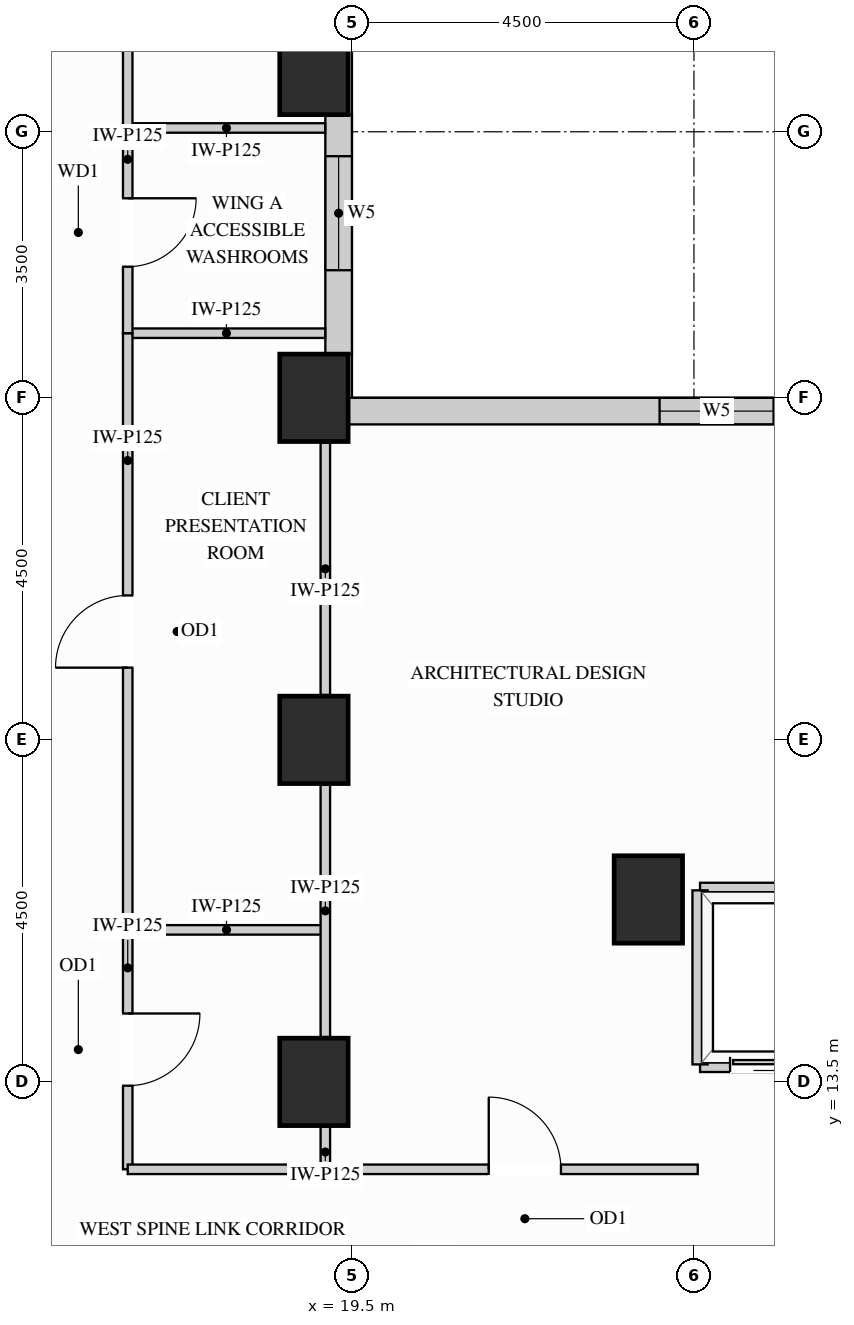
"""IFC4 building model, lengths in metres.
Left out: names, types, materials, properties, quantities, classifications, styles, units other than length and angle.
Written with IfcOpenShell. Run it as: python <this file> out.ifc"""

import sys

from ifc_helpers import new_model, si_unit, direction, frame, frame_2d, origin, origin_2d, place, context, subcontext, project, spatial, rectangle, extrude, source, transform, mapped, element, fill, save


model = new_model("IFC4")
c1 = context("Model", 3, precision=1e-05, world=origin(), true_north=direction((0.0, 1.0)))
c2 = subcontext(c1, "Body", "Model", "MODEL_VIEW")
j1 = project(units=[si_unit("LENGTHUNIT", "METRE"), si_unit("PLANEANGLEUNIT", "RADIAN")], contexts=[c1])
p1 = place(None, origin())
s1 = spatial("IfcSite", under=j1, at=p1, CompositionType="ELEMENT")
p2 = place(p1, origin())
s2 = spatial("IfcBuilding", under=s1, at=p2, CompositionType="ELEMENT")
p3 = place(p2, frame((0.0, 0.0, 84.6)))
s3 = spatial("IfcBuildingStorey", under=s2, at=p3, CompositionType="ELEMENT", Elevation=84.6)
m1 = source(origin(), c2, "Body", "SweptSolid", [
    extrude(rectangle(XDim=0.9, YDim=1.15, at=origin_2d()), origin(), (0.0, 0.0, 1.0), 3.38),
])
for number, where, z_axis, x_axis in (
    (1, (19.0, 13.5, 0.0), (0.0, 0.0, 1.0), (1.0, 0.0, 0.0)),
    (2, (19.0, 18.0, 0.0), (0.0, 0.0, 1.0), (1.0, 0.0, 0.0)),
    (3, (19.0, 22.5, 0.0), (0.0, 0.0, 1.0), (1.0, 0.0, 0.0)),
    (4, (19.0, 26.8, 0.0), (0.0, 0.0, 1.0), (1.0, 0.0, 0.0)),
    (5, (23.4, 15.9, 0.0), (0.0, 0.0, 1.0), (1.0, 0.0, 0.0)),
):
    element("IfcColumn", number, at=place(p3, frame(where, z_axis=z_axis, x_axis=x_axis)), inside=s3, PredefinedType="COLUMN", context=c2, shape_type="MappedRepresentation", body=[
        mapped(m1, transform((0.0, 0.0, 0.0), x_axis=(1.0, 0.0, 0.0), y_axis=(0.0, 1.0, 0.0), z_axis=(0.0, 0.0, 1.0))),
    ])
p4 = place(p3, frame((34.427, 22.325, 0.0), z_axis=(0.0, 0.0, 1.0), x_axis=(-1.0, 0.0, 0.0)))
e6 = element("IfcWall", 6, at=p4, inside=s3, PredefinedType="SOLIDWALL", context=c2, shape_type="SweptSolid", body=[
    extrude(rectangle(XDim=14.979, YDim=0.35, at=frame_2d((7.49, 0.0))), origin(), (0.0, 0.0, 1.0), 3.365),
])
p5 = place(p4, frame((4.1, 0.0, 0.78)))
e7 = element("IfcOpeningElement", 7, at=p5, cuts=e6, PredefinedType="OPENING", context=c2, shape_type="SweptSolid", body=[
    extrude(rectangle(XDim=1.5, YDim=2.0, at=frame_2d((0.75, 1.0))), frame((0.0, 0.185, 0.0), z_axis=(0.0, -1.0, 0.0), x_axis=(1.0, 0.0, 0.0)), (0.0, 0.0, 1.0), 0.37),
])
p6 = place(p4, frame((9.379, 0.0, 0.78)))
e8 = element("IfcOpeningElement", 8, at=p6, cuts=e6, PredefinedType="OPENING", context=c2, shape_type="SweptSolid", body=[
    extrude(rectangle(XDim=1.5, YDim=2.0, at=frame_2d((0.75, 1.0))), frame((0.0, 0.185, 0.0), z_axis=(0.0, -1.0, 0.0), x_axis=(1.0, 0.0, 0.0)), (0.0, 0.0, 1.0), 0.37),
])
p7 = place(p3, frame((19.325, 23.073, 0.0), z_axis=(0.0, 0.0, 1.0), x_axis=(0.0, 1.0, 0.0)))
e9 = element("IfcWall", 9, at=p7, inside=s3, PredefinedType="SOLIDWALL", context=c2, shape_type="SweptSolid", body=[
    extrude(rectangle(XDim=3.154, YDim=0.35, at=frame_2d((1.577, 0.0))), origin(), (0.0, 0.0, 1.0), 2.519),
])
p8 = place(p7, frame((1.105, 0.0, 0.78)))
e10 = element("IfcOpeningElement", 10, at=p8, cuts=e9, PredefinedType="OPENING", context=c2, shape_type="SweptSolid", body=[
    extrude(rectangle(XDim=1.5, YDim=1.559, at=frame_2d((0.75, 0.78))), frame((0.0, 0.185, 0.0), z_axis=(0.0, -1.0, 0.0), x_axis=(1.0, 0.0, 0.0)), (0.0, 0.0, 1.0), 0.37),
])
m2 = source(origin(), c2, "Body", "SweptSolid", [
    extrude(rectangle(XDim=2.6, YDim=0.125, at=frame_2d((1.3, 0.0))), origin(), (0.0, 0.0, 1.0), 3.365),
])
p9 = place(p3, frame((16.55, 15.5, 0.0), z_axis=(0.0, 0.0, 1.0), x_axis=(1.0, 0.0, 0.0)))
e11 = element("IfcWall", 11, at=p9, inside=s3, PredefinedType="PARTITIONING", context=c2, shape_type="MappedRepresentation", body=[
    mapped(m2, transform((0.0, 0.0, 0.0), x_axis=(1.0, 0.0, 0.0), y_axis=(0.0, 1.0, 0.0), z_axis=(0.0, 0.0, 1.0))),
])
m3 = source(origin(), c2, "Body", "SweptSolid", [
    extrude(rectangle(XDim=2.598, YDim=0.125, at=frame_2d((1.299, 0.0))), origin(), (0.0, 0.0, 1.0), 3.365),
])
for number, where, z_axis, x_axis in (
    (12, (16.55, 23.35, 0.0), (0.0, 0.0, 1.0), (1.0, 0.0, 0.0)),
    (13, (16.55, 26.05, 0.0), (0.0, 0.0, 1.0), (1.0, 0.0, 0.0)),
):
    element("IfcWall", number, at=place(p3, frame(where, z_axis=z_axis, x_axis=x_axis)), inside=s3, PredefinedType="PARTITIONING", context=c2, shape_type="MappedRepresentation", body=[
        mapped(m3, transform((0.0, 0.0, 0.0), x_axis=(1.0, 0.0, 0.0), y_axis=(0.0, 1.0, 0.0), z_axis=(0.0, 0.0, 1.0))),
    ])
m4 = source(origin(), c2, "Body", "SweptSolid", [
    extrude(rectangle(XDim=0.56, YDim=0.125, at=frame_2d((0.28, 0.0))), origin(), (0.0, 0.0, 1.0), 2.677),
])
p10 = place(p3, frame((19.15, 12.35, 0.0), z_axis=(0.0, 0.0, 1.0), x_axis=(0.0, 1.0, 0.0)))
e14 = element("IfcWall", 14, at=p10, inside=s3, PredefinedType="PARTITIONING", context=c2, shape_type="MappedRepresentation", body=[
    mapped(m4, transform((0.0, 0.0, 0.0), x_axis=(1.0, 0.0, 0.0), y_axis=(0.0, 1.0, 0.0), z_axis=(0.0, 0.0, 1.0))),
])
m5 = source(origin(), c2, "Body", "SweptSolid", [
    extrude(rectangle(XDim=3.32, YDim=0.125, at=frame_2d((1.66, 0.0))), origin(), (0.0, 0.0, 1.0), 2.677),
])
for number, where, z_axis, x_axis in (
    (15, (19.15, 14.09, 0.0), (0.0, 0.0, 1.0), (0.0, 1.0, 0.0)),
    (16, (19.15, 18.59, 0.0), (0.0, 0.0, 1.0), (0.0, 1.0, 0.0)),
):
    element("IfcWall", number, at=place(p3, frame(where, z_axis=z_axis, x_axis=x_axis)), inside=s3, PredefinedType="PARTITIONING", context=c2, shape_type="MappedRepresentation", body=[
        mapped(m5, transform((0.0, 0.0, 0.0), x_axis=(1.0, 0.0, 0.0), y_axis=(0.0, 1.0, 0.0), z_axis=(0.0, 0.0, 1.0))),
    ])
p11 = place(p3, frame((16.55, 12.35, 0.0), z_axis=(0.0, 0.0, 1.0), x_axis=(0.0, 1.0, 0.0)))
e17 = element("IfcWall", 17, at=p11, inside=s3, PredefinedType="PARTITIONING", context=c2, shape_type="SweptSolid", body=[
    extrude(rectangle(XDim=3.15, YDim=0.125, at=frame_2d((1.575, 0.0))), origin(), (0.0, 0.0, 1.0), 3.365),
])
p12 = place(p11, frame((1.1, 0.0, 0.0)))
e18 = element("IfcOpeningElement", 18, at=p12, cuts=e17, PredefinedType="OPENING", context=c2, shape_type="SweptSolid", body=[
    extrude(rectangle(XDim=0.95, YDim=2.15, at=frame_2d((0.475, 1.075))), frame((0.0, 0.073, 0.0), z_axis=(0.0, -1.0, 0.0), x_axis=(1.0, 0.0, 0.0)), (0.0, 0.0, 1.0), 0.145),
])
p13 = place(p3, frame((16.55, 15.5, 0.0), z_axis=(0.0, 0.0, 1.0), x_axis=(0.0, 1.0, 0.0)))
e19 = element("IfcWall", 19, at=p13, inside=s3, PredefinedType="PARTITIONING", context=c2, shape_type="SweptSolid", body=[
    extrude(rectangle(XDim=7.85, YDim=0.125, at=frame_2d((3.925, 0.0))), origin(), (0.0, 0.0, 1.0), 3.365),
])
p14 = place(p13, frame((3.45, 0.0, 0.0)))
e20 = element("IfcOpeningElement", 20, at=p14, cuts=e19, PredefinedType="OPENING", context=c2, shape_type="SweptSolid", body=[
    extrude(rectangle(XDim=0.95, YDim=2.15, at=frame_2d((0.475, 1.075))), frame((0.0, 0.073, 0.0), z_axis=(0.0, -1.0, 0.0), x_axis=(1.0, 0.0, 0.0)), (0.0, 0.0, 1.0), 0.145),
])
p15 = place(p3, frame((16.55, 26.05, 0.0), z_axis=(0.0, 0.0, 1.0), x_axis=(0.0, 1.0, 0.0)))
e21 = element("IfcWall", 21, at=p15, inside=s3, PredefinedType="PARTITIONING", context=c2, shape_type="SweptSolid", body=[
    extrude(rectangle(XDim=7.1, YDim=0.125, at=frame_2d((3.55, 0.0))), origin(), (0.0, 0.0, 1.0), 3.365),
])
p16 = place(p15, frame((3.075, 0.0, 0.0)))
e22 = element("IfcOpeningElement", 22, at=p16, cuts=e21, PredefinedType="OPENING", context=c2, shape_type="SweptSolid", body=[
    extrude(rectangle(XDim=0.95, YDim=2.15, at=frame_2d((0.475, 1.075))), frame((0.0, 0.073, 0.0), z_axis=(0.0, -1.0, 0.0), x_axis=(1.0, 0.0, 0.0)), (0.0, 0.0, 1.0), 0.145),
])
p17 = place(p3, frame((16.55, 23.35, 0.0), z_axis=(0.0, 0.0, 1.0), x_axis=(0.0, 1.0, 0.0)))
e23 = element("IfcWall", 23, at=p17, inside=s3, PredefinedType="PARTITIONING", context=c2, shape_type="SweptSolid", body=[
    extrude(rectangle(XDim=2.7, YDim=0.125, at=frame_2d((1.35, 0.0))), origin(), (0.0, 0.0, 1.0), 3.365),
])
p18 = place(p17, frame((0.875, 0.0, 0.0)))
e24 = element("IfcOpeningElement", 24, at=p18, cuts=e23, PredefinedType="OPENING", context=c2, shape_type="SweptSolid", body=[
    extrude(rectangle(XDim=0.9, YDim=2.15, at=frame_2d((0.45, 1.075))), frame((0.0, 0.073, 0.0), z_axis=(0.0, -1.0, 0.0), x_axis=(1.0, 0.0, 0.0)), (0.0, 0.0, 1.0), 0.145),
])
m6 = source(origin(), c2, "Body", "SweptSolid", [
    extrude(rectangle(XDim=2.95, YDim=0.125, at=frame_2d((1.475, 0.0))), origin(), (0.0, 0.0, 1.0), 3.365),
])
p19 = place(p3, frame((16.55, 12.35, 0.0), z_axis=(0.0, 0.0, 1.0), x_axis=(1.0, 0.0, 0.0)))
e25 = element("IfcWall", 25, at=p19, inside=s3, PredefinedType="PARTITIONING", context=c2, shape_type="MappedRepresentation", body=[
    mapped(m6, transform((0.0, 0.0, 0.0), x_axis=(1.0, 0.0, 0.0), y_axis=(0.0, 1.0, 0.0), z_axis=(0.0, 0.0, 1.0))),
])
p20 = place(p3, frame((19.5, 12.35, 0.0), z_axis=(0.0, 0.0, 1.0), x_axis=(1.0, 0.0, 0.0)))
e26 = element("IfcWall", 26, at=p20, inside=s3, PredefinedType="PARTITIONING", context=c2, shape_type="SweptSolid", body=[
    extrude(rectangle(XDim=4.55, YDim=0.125, at=frame_2d((2.275, 0.0))), origin(), (0.0, 0.0, 1.0), 3.365),
])
p21 = place(p20, frame((1.8, 0.0, 0.0)))
e27 = element("IfcOpeningElement", 27, at=p21, cuts=e26, PredefinedType="OPENING", context=c2, shape_type="SweptSolid", body=[
    extrude(rectangle(XDim=0.95, YDim=2.15, at=frame_2d((0.475, 1.075))), frame((0.0, 0.073, 0.0), z_axis=(0.0, -1.0, 0.0), x_axis=(1.0, 0.0, 0.0)), (0.0, 0.0, 1.0), 0.145),
])
m7 = source(origin(), c2, "Body", "SweptSolid", [
    extrude(rectangle(XDim=1.89, YDim=0.2, at=frame_2d((0.945, 0.0))), origin(), (0.0, 0.0, 1.0), 2.677),
])
p22 = place(p3, frame((24.08, 16.02, 0.0), z_axis=(0.0, 0.0, 1.0), x_axis=(1.0, 0.0, 0.0)))
e28 = element("IfcWall", 28, at=p22, inside=s3, PredefinedType="PARTITIONING", context=c2, shape_type="MappedRepresentation", body=[
    mapped(m7, transform((0.0, 0.0, 0.0), x_axis=(1.0, 0.0, 0.0), y_axis=(0.0, 1.0, 0.0), z_axis=(0.0, 0.0, 1.0))),
])
p23 = place(p3, frame((24.08, 13.73, 0.0), z_axis=(0.0, 0.0, 1.0), x_axis=(1.0, 0.0, 0.0)))
e29 = element("IfcWall", 29, at=p23, inside=s3, PredefinedType="PARTITIONING", context=c2, shape_type="SweptSolid", body=[
    extrude(rectangle(XDim=1.89, YDim=0.2, at=frame_2d((0.945, 0.0))), origin(), (0.0, 0.0, 1.0), 2.446),
])
p24 = place(p23, frame((0.395, 0.0, 0.0)))
e30 = element("IfcOpeningElement", 30, at=p24, cuts=e29, PredefinedType="OPENING", context=c2, shape_type="SweptSolid", body=[
    extrude(rectangle(XDim=1.1, YDim=2.2, at=frame_2d((0.55, 1.1))), frame((0.0, 0.11, 0.0), z_axis=(0.0, -1.0, 0.0), x_axis=(1.0, 0.0, 0.0)), (0.0, 0.0, 1.0), 0.22),
])
m8 = source(origin(), c2, "Body", "SweptSolid", [
    extrude(rectangle(XDim=2.29, YDim=0.2, at=frame_2d((1.145, 0.0))), origin(), (0.0, 0.0, 1.0), 3.365),
])
p25 = place(p3, frame((24.08, 13.73, 0.0), z_axis=(0.0, 0.0, 1.0), x_axis=(0.0, 1.0, 0.0)))
e31 = element("IfcWall", 31, at=p25, inside=s3, PredefinedType="PARTITIONING", context=c2, shape_type="MappedRepresentation", body=[
    mapped(m8, transform((0.0, 0.0, 0.0), x_axis=(1.0, 0.0, 0.0), y_axis=(0.0, 1.0, 0.0), z_axis=(0.0, 0.0, 1.0))),
])
m9 = source(origin(), c2, "Body", "SweptSolid", [
    extrude(rectangle(XDim=1.1, YDim=2.2, at=frame_2d((0.55, 1.1))), frame((0.0, 0.025, 0.0), z_axis=(0.0, -1.0, 0.0), x_axis=(1.0, 0.0, 0.0)), (0.0, 0.0, 1.0), 0.05),
])
p26 = place(p24, origin())
e32 = element("IfcDoor", 32, at=p26, inside=s3, OperationType="SLIDING_TO_LEFT", PredefinedType="DOOR", context=c2, shape_type="MappedRepresentation", body=[
    mapped(m9, transform((0.0, 0.0, 0.0), x_axis=(1.0, 0.0, 0.0), y_axis=(0.0, 1.0, 0.0), z_axis=(0.0, 0.0, 1.0))),
])
fill(e30, e32)
m10 = source(origin(), c2, "Body", "SweptSolid", [
    extrude(rectangle(XDim=0.95, YDim=2.15, at=frame_2d((0.475, 1.075))), frame((0.0, 0.025, 0.0), z_axis=(0.0, -1.0, 0.0), x_axis=(1.0, 0.0, 0.0)), (0.0, 0.0, 1.0), 0.05),
])
p27 = place(p12, origin())
e33 = element("IfcDoor", 33, at=p27, inside=s3, OperationType="SINGLE_SWING_RIGHT", PredefinedType="DOOR", context=c2, shape_type="MappedRepresentation", body=[
    mapped(m10, transform((0.0, 0.0, 0.0), x_axis=(1.0, 0.0, 0.0), y_axis=(0.0, 1.0, 0.0), z_axis=(0.0, 0.0, 1.0))),
])
fill(e18, e33)
p28 = place(p14, origin())
e34 = element("IfcDoor", 34, at=p28, inside=s3, OperationType="SINGLE_SWING_LEFT", PredefinedType="DOOR", context=c2, shape_type="MappedRepresentation", body=[
    mapped(m10, transform((0.0, 0.0, 0.0), x_axis=(1.0, 0.0, 0.0), y_axis=(0.0, 1.0, 0.0), z_axis=(0.0, 0.0, 1.0))),
])
fill(e20, e34)
p29 = place(p21, origin())
e35 = element("IfcDoor", 35, at=p29, inside=s3, OperationType="SINGLE_SWING_LEFT", PredefinedType="DOOR", context=c2, shape_type="MappedRepresentation", body=[
    mapped(m10, transform((0.0, 0.0, 0.0), x_axis=(1.0, 0.0, 0.0), y_axis=(0.0, 1.0, 0.0), z_axis=(0.0, 0.0, 1.0))),
])
fill(e27, e35)
m11 = source(origin(), c2, "Body", "SweptSolid", [
    extrude(rectangle(XDim=0.9, YDim=2.15, at=frame_2d((0.45, 1.075))), frame((0.0, 0.025, 0.0), z_axis=(0.0, -1.0, 0.0), x_axis=(1.0, 0.0, 0.0)), (0.0, 0.0, 1.0), 0.05),
])
p30 = place(p18, origin())
e36 = element("IfcDoor", 36, at=p30, inside=s3, OperationType="SINGLE_SWING_RIGHT", PredefinedType="DOOR", context=c2, shape_type="MappedRepresentation", body=[
    mapped(m11, transform((0.0, 0.0, 0.0), x_axis=(1.0, 0.0, 0.0), y_axis=(0.0, 1.0, 0.0), z_axis=(0.0, 0.0, 1.0))),
])
fill(e24, e36)
m12 = source(origin(), c2, "Body", "SweptSolid", [
    extrude(rectangle(XDim=1.5, YDim=2.0, at=frame_2d((0.75, 1.0))), frame((0.0, 0.03, 0.0), z_axis=(0.0, -1.0, 0.0), x_axis=(1.0, 0.0, 0.0)), (0.0, 0.0, 1.0), 0.06),
])
p31 = place(p6, origin())
e37 = element("IfcWindow", 37, at=p31, inside=s3, PartitioningType="SINGLE_PANEL", PredefinedType="WINDOW", context=c2, shape_type="MappedRepresentation", body=[
    mapped(m12, transform((0.0, 0.0, 0.0), x_axis=(1.0, 0.0, 0.0), y_axis=(0.0, 1.0, 0.0), z_axis=(0.0, 0.0, 1.0))),
])
fill(e8, e37)
m13 = source(origin(), c2, "Body", "SweptSolid", [
    extrude(rectangle(XDim=1.5, YDim=1.559, at=frame_2d((0.75, 0.78))), frame((0.0, 0.03, 0.0), z_axis=(0.0, -1.0, 0.0), x_axis=(1.0, 0.0, 0.0)), (0.0, 0.0, 1.0), 0.06),
])
p32 = place(p8, origin())
e38 = element("IfcWindow", 38, at=p32, inside=s3, PartitioningType="SINGLE_PANEL", PredefinedType="WINDOW", context=c2, shape_type="MappedRepresentation", body=[
    mapped(m13, transform((0.0, 0.0, 0.0), x_axis=(1.0, 0.0, 0.0), y_axis=(0.0, 1.0, 0.0), z_axis=(0.0, 0.0, 1.0))),
])
fill(e10, e38)
save(model, sys.argv[1])
